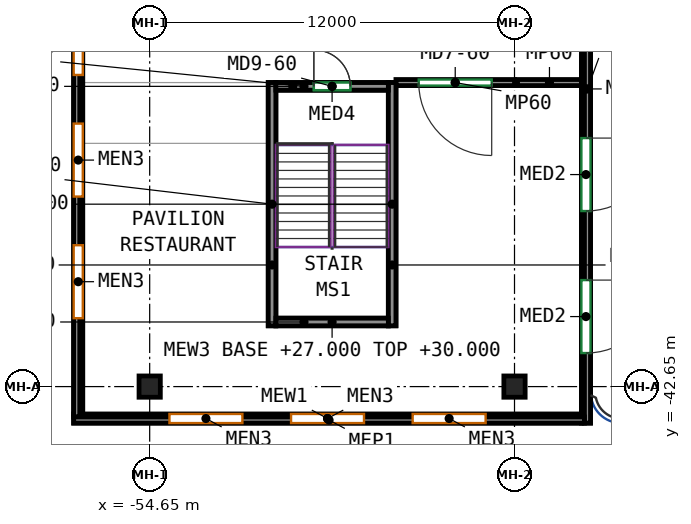
"""IFC4 building model, lengths in metres.
Left out: names, types, materials, properties, quantities, classifications, styles, units other than length and angle.
Written with IfcOpenShell. Run it as: python <this file> out.ifc"""

import sys

from ifc_helpers import new_model, si_unit, direction, frame, frame_2d, origin, origin_2d, place, context, subcontext, project, spatial, rectangle, extrude, source, transform, mapped, element, fill, save


model = new_model("IFC4")
c1 = context("Model", 3, precision=1e-05, world=origin(), true_north=direction((0.0, 1.0)))
c2 = subcontext(c1, "Body", "Model", "MODEL_VIEW")
j1 = project(units=[si_unit("LENGTHUNIT", "METRE"), si_unit("PLANEANGLEUNIT", "RADIAN")], contexts=[c1])
p1 = place(None, origin())
s1 = spatial("IfcSite", under=j1, at=p1, CompositionType="ELEMENT")
p2 = place(p1, origin())
s2 = spatial("IfcBuilding", under=s1, at=p2, CompositionType="ELEMENT")
p3 = place(p2, frame((0.0, 0.0, 22.5)))
s3 = spatial("IfcBuildingStorey", under=s2, at=p3, CompositionType="ELEMENT", Elevation=22.5)
m1 = source(origin(), c2, "Body", "SweptSolid", [
    extrude(rectangle(XDim=0.7, YDim=0.7, at=origin_2d()), origin(), (0.0, 0.0, 1.0), 4.22),
])
for number, where, z_axis, x_axis in (
    (1, (-54.65, -42.65, 0.0), (0.0, 0.0, 1.0), (1.0, 0.0, 0.0)),
    (2, (-42.65, -42.65, 0.0), (0.0, 0.0, 1.0), (1.0, 0.0, 0.0)),
):
    element("IfcColumn", number, at=place(p3, frame(where, z_axis=z_axis, x_axis=x_axis)), inside=s3, PredefinedType="COLUMN", context=c2, shape_type="MappedRepresentation", body=[
        mapped(m1, transform((0.0, 0.0, 0.0))),
    ])
m2 = source(origin(), c2, "Body", "SweptSolid", [
    extrude(rectangle(XDim=8.0, YDim=0.25, at=frame_2d((4.0, 0.0))), origin(), (0.0, 0.0, 1.0), 4.22),
])
for number, where, z_axis, x_axis in (
    (3, (-50.625, -40.65, 0.0), (0.0, 0.0, 1.0), (0.0, 1.0, 0.0)),
    (4, (-46.675, -40.65, 0.0), (0.0, 0.0, 1.0), (0.0, 1.0, 0.0)),
):
    element("IfcWall", number, at=place(p3, frame(where, z_axis=z_axis, x_axis=x_axis)), inside=s3, PredefinedType="SHEAR", context=c2, shape_type="MappedRepresentation", body=[
        mapped(m2, transform((0.0, 0.0, 0.0))),
    ])
m3 = source(origin(), c2, "Body", "SweptSolid", [
    extrude(rectangle(XDim=3.7, YDim=0.25, at=frame_2d((1.85, 0.0))), origin(), (0.0, 0.0, 1.0), 4.22),
])
p4 = place(p3, frame((-50.5, -40.525, 0.0), z_axis=(0.0, 0.0, 1.0), x_axis=(1.0, 0.0, 0.0)))
e5 = element("IfcWall", 5, at=p4, inside=s3, PredefinedType="SHEAR", context=c2, shape_type="MappedRepresentation", body=[
    mapped(m3, transform((0.0, 0.0, 0.0))),
])
p5 = place(p3, frame((-50.5, -32.775, 0.0), z_axis=(0.0, 0.0, 1.0), x_axis=(1.0, 0.0, 0.0)))
e6 = element("IfcWall", 6, at=p5, inside=s3, PredefinedType="SHEAR", context=c2, shape_type="MappedRepresentation", body=[
    mapped(m3, transform((0.0, 0.0, 0.0))),
])
p6 = place(p5, frame((1.25, 0.0, 0.0)))
e7 = element("IfcOpeningElement", 7, at=p6, cuts=e6, PredefinedType="OPENING", context=c2, shape_type="SweptSolid", body=[
    extrude(rectangle(XDim=1.2, YDim=2.1, at=frame_2d((0.6, 1.05))), frame((0.0, 0.135, 0.0), z_axis=(0.0, -1.0, 0.0), x_axis=(1.0, 0.0, 0.0)), (0.0, 0.0, 1.0), 0.27),
])
m4 = source(origin(), c2, "Body", "SweptSolid", [
    extrude(rectangle(XDim=100.7, YDim=0.3, at=frame_2d((50.35, 0.0))), origin(), (0.0, 0.0, 1.0), 4.22),
])
p7 = place(p3, frame((-57.0, -43.55, 0.0), z_axis=(0.0, 0.0, 1.0), x_axis=(0.0, 1.0, 0.0)))
e8 = element("IfcWall", 8, at=p7, inside=s3, PredefinedType="SOLIDWALL", context=c2, shape_type="MappedRepresentation", body=[
    mapped(m4, transform((0.0, 0.0, 0.0))),
])
p8 = place(p7, frame((3.15, 0.0, 0.9)))
e9 = element("IfcOpeningElement", 9, at=p8, cuts=e8, PredefinedType="OPENING", context=c2, shape_type="SweptSolid", body=[
    extrude(rectangle(XDim=2.4, YDim=1.8, at=frame_2d((1.2, 0.9))), frame((0.0, 0.16, 0.0), z_axis=(0.0, -1.0, 0.0), x_axis=(1.0, 0.0, 0.0)), (0.0, 0.0, 1.0), 0.32),
])
p9 = place(p7, frame((7.15, 0.0, 0.9)))
e10 = element("IfcOpeningElement", 10, at=p9, cuts=e8, PredefinedType="OPENING", context=c2, shape_type="SweptSolid", body=[
    extrude(rectangle(XDim=2.4, YDim=1.8, at=frame_2d((1.2, 0.9))), frame((0.0, 0.16, 0.0), z_axis=(0.0, -1.0, 0.0), x_axis=(1.0, 0.0, 0.0)), (0.0, 0.0, 1.0), 0.32),
])
p10 = place(p7, frame((11.15, 0.0, 0.9)))
e11 = element("IfcOpeningElement", 11, at=p10, cuts=e8, PredefinedType="OPENING", context=c2, shape_type="SweptSolid", body=[
    extrude(rectangle(XDim=2.4, YDim=1.8, at=frame_2d((1.2, 0.9))), frame((0.0, 0.16, 0.0), z_axis=(0.0, -1.0, 0.0), x_axis=(1.0, 0.0, 0.0)), (0.0, 0.0, 1.0), 0.32),
])
p11 = place(p7, frame((19.15, 0.0, 0.9)))
e12 = element("IfcOpeningElement", 12, at=p11, cuts=e8, PredefinedType="OPENING", context=c2, shape_type="SweptSolid", body=[
    extrude(rectangle(XDim=2.4, YDim=1.8, at=frame_2d((1.2, 0.9))), frame((0.0, 0.16, 0.0), z_axis=(0.0, -1.0, 0.0), x_axis=(1.0, 0.0, 0.0)), (0.0, 0.0, 1.0), 0.32),
])
p12 = place(p7, frame((23.15, 0.0, 0.9)))
e13 = element("IfcOpeningElement", 13, at=p12, cuts=e8, PredefinedType="OPENING", context=c2, shape_type="SweptSolid", body=[
    extrude(rectangle(XDim=2.4, YDim=1.8, at=frame_2d((1.2, 0.9))), frame((0.0, 0.16, 0.0), z_axis=(0.0, -1.0, 0.0), x_axis=(1.0, 0.0, 0.0)), (0.0, 0.0, 1.0), 0.32),
])
p13 = place(p7, frame((27.15, 0.0, 0.9)))
e14 = element("IfcOpeningElement", 14, at=p13, cuts=e8, PredefinedType="OPENING", context=c2, shape_type="SweptSolid", body=[
    extrude(rectangle(XDim=2.4, YDim=1.8, at=frame_2d((1.2, 0.9))), frame((0.0, 0.16, 0.0), z_axis=(0.0, -1.0, 0.0), x_axis=(1.0, 0.0, 0.0)), (0.0, 0.0, 1.0), 0.32),
])
p14 = place(p7, frame((31.15, 0.0, 0.9)))
e15 = element("IfcOpeningElement", 15, at=p14, cuts=e8, PredefinedType="OPENING", context=c2, shape_type="SweptSolid", body=[
    extrude(rectangle(XDim=2.4, YDim=1.8, at=frame_2d((1.2, 0.9))), frame((0.0, 0.16, 0.0), z_axis=(0.0, -1.0, 0.0), x_axis=(1.0, 0.0, 0.0)), (0.0, 0.0, 1.0), 0.32),
])
p15 = place(p7, frame((39.15, 0.0, 0.9)))
e16 = element("IfcOpeningElement", 16, at=p15, cuts=e8, PredefinedType="OPENING", context=c2, shape_type="SweptSolid", body=[
    extrude(rectangle(XDim=2.4, YDim=1.8, at=frame_2d((1.2, 0.9))), frame((0.0, 0.16, 0.0), z_axis=(0.0, -1.0, 0.0), x_axis=(1.0, 0.0, 0.0)), (0.0, 0.0, 1.0), 0.32),
])
p16 = place(p7, frame((43.15, 0.0, 0.9)))
e17 = element("IfcOpeningElement", 17, at=p16, cuts=e8, PredefinedType="OPENING", context=c2, shape_type="SweptSolid", body=[
    extrude(rectangle(XDim=2.4, YDim=1.8, at=frame_2d((1.2, 0.9))), frame((0.0, 0.16, 0.0), z_axis=(0.0, -1.0, 0.0), x_axis=(1.0, 0.0, 0.0)), (0.0, 0.0, 1.0), 0.32),
])
p17 = place(p7, frame((51.15, 0.0, 0.9)))
e18 = element("IfcOpeningElement", 18, at=p17, cuts=e8, PredefinedType="OPENING", context=c2, shape_type="SweptSolid", body=[
    extrude(rectangle(XDim=2.4, YDim=1.8, at=frame_2d((1.2, 0.9))), frame((0.0, 0.16, 0.0), z_axis=(0.0, -1.0, 0.0), x_axis=(1.0, 0.0, 0.0)), (0.0, 0.0, 1.0), 0.32),
])
p18 = place(p7, frame((55.15, 0.0, 0.9)))
e19 = element("IfcOpeningElement", 19, at=p18, cuts=e8, PredefinedType="OPENING", context=c2, shape_type="SweptSolid", body=[
    extrude(rectangle(XDim=2.4, YDim=1.8, at=frame_2d((1.2, 0.9))), frame((0.0, 0.16, 0.0), z_axis=(0.0, -1.0, 0.0), x_axis=(1.0, 0.0, 0.0)), (0.0, 0.0, 1.0), 0.32),
])
p19 = place(p7, frame((59.15, 0.0, 0.9)))
e20 = element("IfcOpeningElement", 20, at=p19, cuts=e8, PredefinedType="OPENING", context=c2, shape_type="SweptSolid", body=[
    extrude(rectangle(XDim=2.4, YDim=1.8, at=frame_2d((1.2, 0.9))), frame((0.0, 0.16, 0.0), z_axis=(0.0, -1.0, 0.0), x_axis=(1.0, 0.0, 0.0)), (0.0, 0.0, 1.0), 0.32),
])
p20 = place(p7, frame((63.15, 0.0, 0.9)))
e21 = element("IfcOpeningElement", 21, at=p20, cuts=e8, PredefinedType="OPENING", context=c2, shape_type="SweptSolid", body=[
    extrude(rectangle(XDim=2.4, YDim=1.8, at=frame_2d((1.2, 0.9))), frame((0.0, 0.16, 0.0), z_axis=(0.0, -1.0, 0.0), x_axis=(1.0, 0.0, 0.0)), (0.0, 0.0, 1.0), 0.32),
])
p21 = place(p7, frame((67.15, 0.0, 0.9)))
e22 = element("IfcOpeningElement", 22, at=p21, cuts=e8, PredefinedType="OPENING", context=c2, shape_type="SweptSolid", body=[
    extrude(rectangle(XDim=2.4, YDim=1.8, at=frame_2d((1.2, 0.9))), frame((0.0, 0.16, 0.0), z_axis=(0.0, -1.0, 0.0), x_axis=(1.0, 0.0, 0.0)), (0.0, 0.0, 1.0), 0.32),
])
p22 = place(p7, frame((75.15, 0.0, 0.9)))
e23 = element("IfcOpeningElement", 23, at=p22, cuts=e8, PredefinedType="OPENING", context=c2, shape_type="SweptSolid", body=[
    extrude(rectangle(XDim=2.4, YDim=1.8, at=frame_2d((1.2, 0.9))), frame((0.0, 0.16, 0.0), z_axis=(0.0, -1.0, 0.0), x_axis=(1.0, 0.0, 0.0)), (0.0, 0.0, 1.0), 0.32),
])
p23 = place(p7, frame((79.15, 0.0, 0.9)))
e24 = element("IfcOpeningElement", 24, at=p23, cuts=e8, PredefinedType="OPENING", context=c2, shape_type="SweptSolid", body=[
    extrude(rectangle(XDim=2.4, YDim=1.8, at=frame_2d((1.2, 0.9))), frame((0.0, 0.16, 0.0), z_axis=(0.0, -1.0, 0.0), x_axis=(1.0, 0.0, 0.0)), (0.0, 0.0, 1.0), 0.32),
])
p24 = place(p7, frame((83.15, 0.0, 0.9)))
e25 = element("IfcOpeningElement", 25, at=p24, cuts=e8, PredefinedType="OPENING", context=c2, shape_type="SweptSolid", body=[
    extrude(rectangle(XDim=2.4, YDim=1.8, at=frame_2d((1.2, 0.9))), frame((0.0, 0.16, 0.0), z_axis=(0.0, -1.0, 0.0), x_axis=(1.0, 0.0, 0.0)), (0.0, 0.0, 1.0), 0.32),
])
p25 = place(p7, frame((87.15, 0.0, 0.9)))
e26 = element("IfcOpeningElement", 26, at=p25, cuts=e8, PredefinedType="OPENING", context=c2, shape_type="SweptSolid", body=[
    extrude(rectangle(XDim=2.4, YDim=1.8, at=frame_2d((1.2, 0.9))), frame((0.0, 0.16, 0.0), z_axis=(0.0, -1.0, 0.0), x_axis=(1.0, 0.0, 0.0)), (0.0, 0.0, 1.0), 0.32),
])
p26 = place(p7, frame((91.15, 0.0, 0.9)))
e27 = element("IfcOpeningElement", 27, at=p26, cuts=e8, PredefinedType="OPENING", context=c2, shape_type="SweptSolid", body=[
    extrude(rectangle(XDim=2.4, YDim=1.8, at=frame_2d((1.2, 0.9))), frame((0.0, 0.16, 0.0), z_axis=(0.0, -1.0, 0.0), x_axis=(1.0, 0.0, 0.0)), (0.0, 0.0, 1.0), 0.32),
])
p27 = place(p7, frame((95.15, 0.0, 0.9)))
e28 = element("IfcOpeningElement", 28, at=p27, cuts=e8, PredefinedType="OPENING", context=c2, shape_type="SweptSolid", body=[
    extrude(rectangle(XDim=2.4, YDim=1.8, at=frame_2d((1.2, 0.9))), frame((0.0, 0.16, 0.0), z_axis=(0.0, -1.0, 0.0), x_axis=(1.0, 0.0, 0.0)), (0.0, 0.0, 1.0), 0.32),
])
m5 = source(origin(), c2, "Body", "SweptSolid", [
    extrude(rectangle(XDim=15.7, YDim=0.3, at=frame_2d((7.85, 0.0))), origin(), (0.0, 0.0, 1.0), 4.22),
])
p28 = place(p3, frame((-40.3, -28.15, 0.0), z_axis=(0.0, 0.0, 1.0), x_axis=(0.0, -1.0, 0.0)))
e29 = element("IfcWall", 29, at=p28, inside=s3, PredefinedType="SOLIDWALL", context=c2, shape_type="MappedRepresentation", body=[
    mapped(m5, transform((0.0, 0.0, 0.0))),
])
p29 = place(p28, frame((6.326, 0.0, 0.0)))
e30 = element("IfcOpeningElement", 30, at=p29, cuts=e29, PredefinedType="OPENING", context=c2, shape_type="SweptSolid", body=[
    extrude(rectangle(XDim=2.4, YDim=2.4, at=frame_2d((1.2, 1.2))), frame((0.0, 0.16, 0.0), z_axis=(0.0, -1.0, 0.0), x_axis=(1.0, 0.0, 0.0)), (0.0, 0.0, 1.0), 0.32),
])
p30 = place(p28, frame((10.997, 0.0, 0.0)))
e31 = element("IfcOpeningElement", 31, at=p30, cuts=e29, PredefinedType="OPENING", context=c2, shape_type="SweptSolid", body=[
    extrude(rectangle(XDim=2.4, YDim=2.4, at=frame_2d((1.2, 1.2))), frame((0.0, 0.16, 0.0), z_axis=(0.0, -1.0, 0.0), x_axis=(1.0, 0.0, 0.0)), (0.0, 0.0, 1.0), 0.32),
])
m6 = source(origin(), c2, "Body", "SweptSolid", [
    extrude(rectangle(XDim=16.7, YDim=0.3, at=frame_2d((8.35, 0.0))), origin(), (0.0, 0.0, 1.0), 4.22),
])
p31 = place(p3, frame((-40.45, -43.7, 0.0), z_axis=(0.0, 0.0, 1.0), x_axis=(-1.0, 0.0, 0.0)))
e32 = element("IfcWall", 32, at=p31, inside=s3, PredefinedType="SOLIDWALL", context=c2, shape_type="MappedRepresentation", body=[
    mapped(m6, transform((0.0, 0.0, 0.0))),
])
p32 = place(p31, frame((3.15, 0.0, 0.9)))
e33 = element("IfcOpeningElement", 33, at=p32, cuts=e32, PredefinedType="OPENING", context=c2, shape_type="SweptSolid", body=[
    extrude(rectangle(XDim=2.4, YDim=1.8, at=frame_2d((1.2, 0.9))), frame((0.0, 0.16, 0.0), z_axis=(0.0, -1.0, 0.0), x_axis=(1.0, 0.0, 0.0)), (0.0, 0.0, 1.0), 0.32),
])
p33 = place(p31, frame((7.15, 0.0, 0.9)))
e34 = element("IfcOpeningElement", 34, at=p33, cuts=e32, PredefinedType="OPENING", context=c2, shape_type="SweptSolid", body=[
    extrude(rectangle(XDim=2.4, YDim=1.8, at=frame_2d((1.2, 0.9))), frame((0.0, 0.16, 0.0), z_axis=(0.0, -1.0, 0.0), x_axis=(1.0, 0.0, 0.0)), (0.0, 0.0, 1.0), 0.32),
])
p34 = place(p31, frame((11.15, 0.0, 0.9)))
e35 = element("IfcOpeningElement", 35, at=p34, cuts=e32, PredefinedType="OPENING", context=c2, shape_type="SweptSolid", body=[
    extrude(rectangle(XDim=2.4, YDim=1.8, at=frame_2d((1.2, 0.9))), frame((0.0, 0.16, 0.0), z_axis=(0.0, -1.0, 0.0), x_axis=(1.0, 0.0, 0.0)), (0.0, 0.0, 1.0), 0.32),
])
m7 = source(origin(), c2, "Body", "SweptSolid", [
    extrude(rectangle(XDim=100.8, YDim=0.2, at=frame_2d((50.4, 0.0))), origin(), (0.0, 0.0, 1.0), 1.1),
])
p35 = place(p3, frame((-57.05, -43.65, 4.5), z_axis=(0.0, 0.0, 1.0), x_axis=(0.0, 1.0, 0.0)))
e36 = element("IfcWall", 36, at=p35, inside=s3, PredefinedType="PARAPET", context=c2, shape_type="MappedRepresentation", body=[
    mapped(m7, transform((0.0, 0.0, 0.0))),
])
m8 = source(origin(), c2, "Body", "SweptSolid", [
    extrude(rectangle(XDim=15.7, YDim=0.2, at=frame_2d((7.85, 0.0))), origin(), (0.0, 0.0, 1.0), 1.1),
])
p36 = place(p3, frame((-40.25, -28.15, 4.5), z_axis=(0.0, 0.0, 1.0), x_axis=(0.0, -1.0, 0.0)))
e37 = element("IfcWall", 37, at=p36, inside=s3, PredefinedType="PARAPET", context=c2, shape_type="MappedRepresentation", body=[
    mapped(m8, transform((0.0, 0.0, 0.0))),
])
m9 = source(origin(), c2, "Body", "SweptSolid", [
    extrude(rectangle(XDim=16.8, YDim=0.2, at=frame_2d((8.4, 0.0))), origin(), (0.0, 0.0, 1.0), 1.1),
])
p37 = place(p3, frame((-40.35, -43.75, 4.5), z_axis=(0.0, 0.0, 1.0), x_axis=(-1.0, 0.0, 0.0)))
e38 = element("IfcWall", 38, at=p37, inside=s3, PredefinedType="PARAPET", context=c2, shape_type="MappedRepresentation", body=[
    mapped(m9, transform((0.0, 0.0, 0.0))),
])
m10 = source(origin(), c2, "Body", "SweptSolid", [
    extrude(rectangle(XDim=8.0, YDim=0.25, at=frame_2d((4.0, 0.0))), origin(), (0.0, 0.0, 1.0), 3.0),
])
for number, where, z_axis, x_axis in (
    (39, (-50.625, -40.65, 4.5), (0.0, 0.0, 1.0), (0.0, 1.0, 0.0)),
    (40, (-46.675, -40.65, 4.5), (0.0, 0.0, 1.0), (0.0, 1.0, 0.0)),
):
    element("IfcWall", number, at=place(p3, frame(where, z_axis=z_axis, x_axis=x_axis)), inside=s3, PredefinedType="SOLIDWALL", context=c2, shape_type="MappedRepresentation", body=[
        mapped(m10, transform((0.0, 0.0, 0.0))),
    ])
m11 = source(origin(), c2, "Body", "SweptSolid", [
    extrude(rectangle(XDim=3.7, YDim=0.25, at=frame_2d((1.85, 0.0))), origin(), (0.0, 0.0, 1.0), 3.0),
])
p38 = place(p3, frame((-50.5, -40.525, 4.5), z_axis=(0.0, 0.0, 1.0), x_axis=(1.0, 0.0, 0.0)))
e41 = element("IfcWall", 41, at=p38, inside=s3, PredefinedType="SOLIDWALL", context=c2, shape_type="MappedRepresentation", body=[
    mapped(m11, transform((0.0, 0.0, 0.0))),
])
p39 = place(p3, frame((-50.5, -32.775, 4.5), z_axis=(0.0, 0.0, 1.0), x_axis=(1.0, 0.0, 0.0)))
e42 = element("IfcWall", 42, at=p39, inside=s3, PredefinedType="SOLIDWALL", context=c2, shape_type="MappedRepresentation", body=[
    mapped(m11, transform((0.0, 0.0, 0.0))),
])
p40 = place(p39, frame((1.25, 0.0, 0.0)))
e43 = element("IfcOpeningElement", 43, at=p40, cuts=e42, PredefinedType="OPENING", context=c2, shape_type="SweptSolid", body=[
    extrude(rectangle(XDim=1.2, YDim=2.1, at=frame_2d((0.6, 1.05))), frame((0.0, 0.135, 0.0), z_axis=(0.0, -1.0, 0.0), x_axis=(1.0, 0.0, 0.0)), (0.0, 0.0, 1.0), 0.27),
])
m12 = source(origin(), c2, "Body", "SweptSolid", [
    extrude(rectangle(XDim=3.9, YDim=0.2, at=frame_2d((1.95, 0.0))), origin(), (0.0, 0.0, 1.0), 3.42),
])
p41 = place(p3, frame((-42.65, -32.65, 0.0), z_axis=(0.0, 0.0, 1.0), x_axis=(-1.0, 0.0, 0.0)))
e44 = element("IfcWall", 44, at=p41, inside=s3, PredefinedType="PARTITIONING", context=c2, shape_type="MappedRepresentation", body=[
    mapped(m12, transform((0.0, 0.0, 0.0))),
])
p42 = place(p41, frame((0.75, 0.0, 0.0)))
e45 = element("IfcOpeningElement", 45, at=p42, cuts=e44, PredefinedType="OPENING", context=c2, shape_type="SweptSolid", body=[
    extrude(rectangle(XDim=2.4, YDim=2.4, at=frame_2d((1.2, 1.2))), frame((0.0, 0.11, 0.0), z_axis=(0.0, -1.0, 0.0), x_axis=(1.0, 0.0, 0.0)), (0.0, 0.0, 1.0), 0.22),
])
m13 = source(origin(), c2, "Body", "SweptSolid", [
    extrude(rectangle(XDim=2.1, YDim=0.2, at=frame_2d((1.05, 0.0))), origin(), (0.0, 0.0, 1.0), 3.42),
])
p43 = place(p3, frame((-40.45, -32.65, 0.0), z_axis=(0.0, 0.0, 1.0), x_axis=(-1.0, 0.0, 0.0)))
e46 = element("IfcWall", 46, at=p43, inside=s3, PredefinedType="PARTITIONING", context=c2, shape_type="MappedRepresentation", body=[
    mapped(m13, transform((0.0, 0.0, 0.0))),
])
p44 = place(p29, origin())
e47 = element("IfcDoor", 47, at=p44, inside=s3, OperationType="DOUBLE_DOOR_SINGLE_SWING", PredefinedType="DOOR", context=c2, shape_type="SweptSolid", body=[
    extrude(rectangle(XDim=2.4, YDim=2.4, at=frame_2d((1.2, 1.2))), frame((0.0, 0.025, 0.0), z_axis=(0.0, -1.0, 0.0), x_axis=(1.0, 0.0, 0.0)), (0.0, 0.0, 1.0), 0.05),
])
fill(e30, e47)
p45 = place(p30, origin())
e48 = element("IfcDoor", 48, at=p45, inside=s3, OperationType="DOUBLE_DOOR_SINGLE_SWING", PredefinedType="DOOR", context=c2, shape_type="SweptSolid", body=[
    extrude(rectangle(XDim=2.4, YDim=2.4, at=frame_2d((1.2, 1.2))), frame((0.0, 0.025, 0.0), z_axis=(0.0, -1.0, 0.0), x_axis=(1.0, 0.0, 0.0)), (0.0, 0.0, 1.0), 0.05),
])
fill(e31, e48)
p46 = place(p8, origin())
e49 = element("IfcWindow", 49, at=p46, inside=s3, PartitioningType="SINGLE_PANEL", PredefinedType="WINDOW", context=c2, shape_type="SweptSolid", body=[
    extrude(rectangle(XDim=2.4, YDim=1.8, at=frame_2d((1.2, 0.9))), frame((0.0, 0.03, 0.0), z_axis=(0.0, -1.0, 0.0), x_axis=(1.0, 0.0, 0.0)), (0.0, 0.0, 1.0), 0.06),
])
fill(e9, e49)
p47 = place(p9, origin())
e50 = element("IfcWindow", 50, at=p47, inside=s3, PartitioningType="SINGLE_PANEL", PredefinedType="WINDOW", context=c2, shape_type="SweptSolid", body=[
    extrude(rectangle(XDim=2.4, YDim=1.8, at=frame_2d((1.2, 0.9))), frame((0.0, 0.03, 0.0), z_axis=(0.0, -1.0, 0.0), x_axis=(1.0, 0.0, 0.0)), (0.0, 0.0, 1.0), 0.06),
])
fill(e10, e50)
p48 = place(p10, origin())
e51 = element("IfcWindow", 51, at=p48, inside=s3, PartitioningType="SINGLE_PANEL", PredefinedType="WINDOW", context=c2, shape_type="SweptSolid", body=[
    extrude(rectangle(XDim=2.4, YDim=1.8, at=frame_2d((1.2, 0.9))), frame((0.0, 0.03, 0.0), z_axis=(0.0, -1.0, 0.0), x_axis=(1.0, 0.0, 0.0)), (0.0, 0.0, 1.0), 0.06),
])
fill(e11, e51)
p49 = place(p32, origin())
e52 = element("IfcWindow", 52, at=p49, inside=s3, PartitioningType="SINGLE_PANEL", PredefinedType="WINDOW", context=c2, shape_type="SweptSolid", body=[
    extrude(rectangle(XDim=2.4, YDim=1.8, at=frame_2d((1.2, 0.9))), frame((0.0, 0.03, 0.0), z_axis=(0.0, -1.0, 0.0), x_axis=(1.0, 0.0, 0.0)), (0.0, 0.0, 1.0), 0.06),
])
fill(e33, e52)
p50 = place(p33, origin())
e53 = element("IfcWindow", 53, at=p50, inside=s3, PartitioningType="SINGLE_PANEL", PredefinedType="WINDOW", context=c2, shape_type="SweptSolid", body=[
    extrude(rectangle(XDim=2.4, YDim=1.8, at=frame_2d((1.2, 0.9))), frame((0.0, 0.03, 0.0), z_axis=(0.0, -1.0, 0.0), x_axis=(1.0, 0.0, 0.0)), (0.0, 0.0, 1.0), 0.06),
])
fill(e34, e53)
p51 = place(p34, origin())
e54 = element("IfcWindow", 54, at=p51, inside=s3, PartitioningType="SINGLE_PANEL", PredefinedType="WINDOW", context=c2, shape_type="SweptSolid", body=[
    extrude(rectangle(XDim=2.4, YDim=1.8, at=frame_2d((1.2, 0.9))), frame((0.0, 0.03, 0.0), z_axis=(0.0, -1.0, 0.0), x_axis=(1.0, 0.0, 0.0)), (0.0, 0.0, 1.0), 0.06),
])
fill(e35, e54)
p52 = place(p40, origin())
e55 = element("IfcDoor", 55, at=p52, inside=s3, OperationType="DOUBLE_DOOR_SINGLE_SWING", PredefinedType="DOOR", context=c2, shape_type="SweptSolid", body=[
    extrude(rectangle(XDim=1.2, YDim=2.1, at=frame_2d((0.6, 1.05))), frame((0.0, 0.025, 0.0), z_axis=(0.0, -1.0, 0.0), x_axis=(1.0, 0.0, 0.0)), (0.0, 0.0, 1.0), 0.05),
])
fill(e43, e55)
p53 = place(p6, origin())
e56 = element("IfcDoor", 56, at=p53, inside=s3, OperationType="DOUBLE_DOOR_SINGLE_SWING", PredefinedType="DOOR", context=c2, shape_type="SweptSolid", body=[
    extrude(rectangle(XDim=1.2, YDim=2.1, at=frame_2d((0.6, 1.05))), frame((0.0, 0.025, 0.0), z_axis=(0.0, -1.0, 0.0), x_axis=(1.0, 0.0, 0.0)), (0.0, 0.0, 1.0), 0.05),
])
fill(e7, e56)
p54 = place(p42, origin())
e57 = element("IfcDoor", 57, at=p54, inside=s3, OperationType="DOUBLE_DOOR_SINGLE_SWING", PredefinedType="DOOR", context=c2, shape_type="SweptSolid", body=[
    extrude(rectangle(XDim=2.4, YDim=2.4, at=frame_2d((1.2, 1.2))), frame((0.0, 0.025, 0.0), z_axis=(0.0, -1.0, 0.0), x_axis=(1.0, 0.0, 0.0)), (0.0, 0.0, 1.0), 0.05),
])
fill(e45, e57)
save(model, sys.argv[1])
